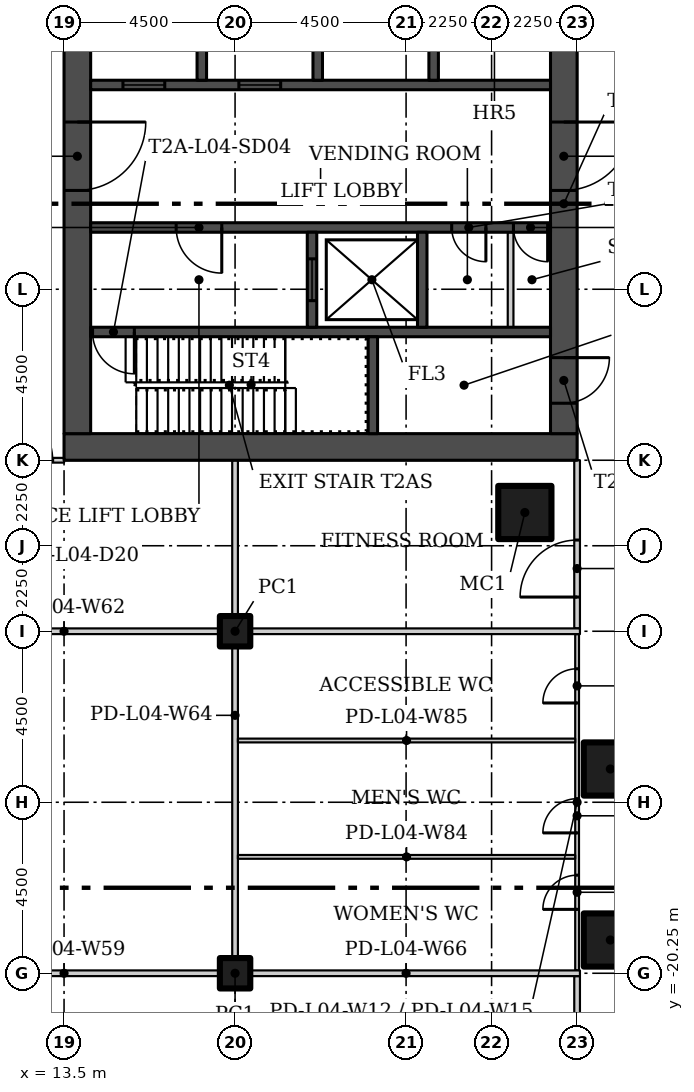
"""IFC4 building model, lengths in metres.
Left out: names, types, materials, properties, quantities, classifications, styles, units other than length and angle.
Written with IfcOpenShell. Run it as: python <this file> out.ifc"""

import sys

from ifc_helpers import new_model, si_unit, direction, frame, frame_2d, origin, origin_2d, place, context, subcontext, project, spatial, rectangle, hollow_rectangle, extrude, element, fill, save


model = new_model("IFC4")
c1 = context("Model", 3, precision=1e-05, world=origin(), true_north=direction((0.0, 1.0)))
c2 = subcontext(c1, "Body", "Model", "MODEL_VIEW")
j1 = project(units=[si_unit("LENGTHUNIT", "METRE"), si_unit("PLANEANGLEUNIT", "RADIAN")], contexts=[c1])
p1 = place(None, origin())
s1 = spatial("IfcSite", under=j1, at=p1, CompositionType="ELEMENT")
p2 = place(p1, origin())
s2 = spatial("IfcBuilding", under=s1, at=p2, CompositionType="ELEMENT")
p3 = place(p2, frame((0.0, 0.0, 23.5)))
s3 = spatial("IfcBuildingStorey", under=s2, at=p3, CompositionType="ELEMENT", Elevation=23.5)
for number, where in (
    (1, (25.625, -8.125, 0.0)),
    (2, (27.875, -14.875, 0.0)),
    (3, (27.875, -19.375, 0.0)),
):
    element("IfcColumn", number, at=place(p3, frame(where)), inside=s3, PredefinedType="COLUMN", context=c2, shape_type="SweptSolid", body=[
        extrude(hollow_rectangle(XDim=1.4, YDim=1.4, WallThickness=0.06, at=origin_2d()), origin(), (0.0, 0.0, 1.0), 4.65),
    ])
for number, where in (
    (4, (18.0, -20.25, 0.0)),
    (5, (18.0, -11.25, 0.0)),
):
    element("IfcColumn", number, at=place(p3, frame(where)), inside=s3, PredefinedType="COLUMN", context=c2, shape_type="SweptSolid", body=[
        extrude(hollow_rectangle(XDim=0.8, YDim=0.8, WallThickness=0.03, at=origin_2d()), origin(), (0.0, 0.0, 1.0), 4.65),
    ])
p4 = place(p3, frame((27.0, -20.325, 0.0), z_axis=(0.0, 0.0, 1.0), x_axis=(0.0, -1.0, 0.0)))
e6 = element("IfcWall", 6, at=p4, inside=s3, PredefinedType="PARTITIONING", context=c2, shape_type="SweptSolid", body=[
    extrude(rectangle(XDim=8.85, YDim=0.15, at=frame_2d((4.425, 0.0))), origin(), (0.0, 0.0, 1.0), 4.65),
])
p5 = place(p4, frame((4.275, 0.0, 0.0)))
e7 = element("IfcOpeningElement", 7, at=p5, cuts=e6, PredefinedType="OPENING", context=c2, shape_type="SweptSolid", body=[
    extrude(rectangle(XDim=1.5, YDim=2.1, at=frame_2d((0.75, 1.05))), frame((0.0, 0.085, 0.0), z_axis=(0.0, -1.0, 0.0), x_axis=(1.0, 0.0, 0.0)), (0.0, 0.0, 1.0), 0.17),
])
p6 = place(p3, frame((27.0, -20.175, 0.0), z_axis=(0.0, 0.0, 1.0), x_axis=(0.0, 1.0, 0.0)))
e8 = element("IfcWall", 8, at=p6, inside=s3, PredefinedType="PARTITIONING", context=c2, shape_type="SweptSolid", body=[
    extrude(rectangle(XDim=8.85, YDim=0.1, at=frame_2d((4.425, 0.0))), origin(), (0.0, 0.0, 1.0), 4.65),
])
p7 = place(p6, frame((1.606, 0.0, 0.0)))
e9 = element("IfcOpeningElement", 9, at=p7, cuts=e8, PredefinedType="OPENING", context=c2, shape_type="SweptSolid", body=[
    extrude(rectangle(XDim=0.9, YDim=2.1, at=frame_2d((0.45, 1.05))), frame((0.0, 0.06, 0.0), z_axis=(0.0, -1.0, 0.0), x_axis=(1.0, 0.0, 0.0)), (0.0, 0.0, 1.0), 0.12),
])
p8 = place(p6, frame((3.619, 0.0, 0.0)))
e10 = element("IfcOpeningElement", 10, at=p8, cuts=e8, PredefinedType="OPENING", context=c2, shape_type="SweptSolid", body=[
    extrude(rectangle(XDim=0.9, YDim=2.1, at=frame_2d((0.45, 1.05))), frame((0.0, 0.06, 0.0), z_axis=(0.0, -1.0, 0.0), x_axis=(1.0, 0.0, 0.0)), (0.0, 0.0, 1.0), 0.12),
])
p9 = place(p6, frame((7.038, 0.0, 0.0)))
e11 = element("IfcOpeningElement", 11, at=p9, cuts=e8, PredefinedType="OPENING", context=c2, shape_type="SweptSolid", body=[
    extrude(rectangle(XDim=0.9, YDim=2.1, at=frame_2d((0.45, 1.05))), frame((0.0, 0.06, 0.0), z_axis=(0.0, -1.0, 0.0), x_axis=(1.0, 0.0, 0.0)), (0.0, 0.0, 1.0), 0.12),
])
p10 = place(p3, frame((27.0, -11.175, 0.0), z_axis=(0.0, 0.0, 1.0), x_axis=(0.0, 1.0, 0.0)))
e12 = element("IfcWall", 12, at=p10, inside=s3, PredefinedType="PARTITIONING", context=c2, shape_type="SweptSolid", body=[
    extrude(rectangle(XDim=4.425, YDim=0.15, at=frame_2d((2.212, 0.0))), origin(), (0.0, 0.0, 1.0), 4.65),
])
p11 = place(p10, frame((0.825, 0.0, 0.0)))
e13 = element("IfcOpeningElement", 13, at=p11, cuts=e12, PredefinedType="OPENING", context=c2, shape_type="SweptSolid", body=[
    extrude(rectangle(XDim=1.5, YDim=2.1, at=frame_2d((0.75, 1.05))), frame((0.0, 0.085, 0.0), z_axis=(0.0, -1.0, 0.0), x_axis=(1.0, 0.0, 0.0)), (0.0, 0.0, 1.0), 0.17),
])
p12 = place(p3, frame((-13.5, -6.75, 0.0)))
e14 = element("IfcWall", 14, at=p12, inside=s3, PredefinedType="PARTITIONING", context=c2, shape_type="SweptSolid", body=[
    extrude(rectangle(XDim=27.0, YDim=0.125, at=frame_2d((13.5, 0.0))), origin(), (0.0, 0.0, 1.0), 4.65),
])
p13 = place(p12, frame((8.85, 0.0, 0.0)))
e15 = element("IfcOpeningElement", 15, at=p13, cuts=e14, PredefinedType="OPENING", context=c2, shape_type="SweptSolid", body=[
    extrude(rectangle(XDim=1.5, YDim=2.1, at=frame_2d((0.75, 1.05))), frame((0.0, 0.073, 0.0), z_axis=(0.0, -1.0, 0.0), x_axis=(1.0, 0.0, 0.0)), (0.0, 0.0, 1.0), 0.145),
])
p14 = place(p12, frame((14.55, 0.0, 0.0)))
e16 = element("IfcOpeningElement", 16, at=p14, cuts=e14, PredefinedType="OPENING", context=c2, shape_type="SweptSolid", body=[
    extrude(rectangle(XDim=1.5, YDim=2.1, at=frame_2d((0.75, 1.05))), frame((0.0, 0.073, 0.0), z_axis=(0.0, -1.0, 0.0), x_axis=(1.0, 0.0, 0.0)), (0.0, 0.0, 1.0), 0.145),
])
p15 = place(p12, frame((25.2, 0.0, 0.0)))
e17 = element("IfcOpeningElement", 17, at=p15, cuts=e14, PredefinedType="OPENING", context=c2, shape_type="SweptSolid", body=[
    extrude(rectangle(XDim=1.5, YDim=2.1, at=frame_2d((0.75, 1.05))), frame((0.0, 0.073, 0.0), z_axis=(0.0, -1.0, 0.0), x_axis=(1.0, 0.0, 0.0)), (0.0, 0.0, 1.0), 0.145),
])
p16 = place(p3, frame((8.925, -20.25, 0.0)))
e18 = element("IfcWall", 18, at=p16, inside=s3, PredefinedType="PARTITIONING", context=c2, shape_type="SweptSolid", body=[
    extrude(rectangle(XDim=9.15, YDim=0.15, at=frame_2d((4.575, 0.0))), origin(), (0.0, 0.0, 1.0), 4.65),
])
p17 = place(p3, frame((27.075, -11.25, 0.0), z_axis=(0.0, 0.0, 1.0), x_axis=(-1.0, 0.0, 0.0)))
e19 = element("IfcWall", 19, at=p17, inside=s3, PredefinedType="PARTITIONING", context=c2, shape_type="SweptSolid", body=[
    extrude(rectangle(XDim=27.15, YDim=0.15, at=frame_2d((13.575, 0.0))), origin(), (0.0, 0.0, 1.0), 4.65),
])
p18 = place(p3, frame((18.0, -20.175, 0.0), z_axis=(0.0, 0.0, 1.0), x_axis=(0.0, 1.0, 0.0)))
e20 = element("IfcWall", 20, at=p18, inside=s3, PredefinedType="PARTITIONING", context=c2, shape_type="SweptSolid", body=[
    extrude(rectangle(XDim=13.425, YDim=0.15, at=frame_2d((6.712, 0.0))), origin(), (0.0, 0.0, 1.0), 4.65),
])
p19 = place(p3, frame((27.075, -20.25, 0.0), z_axis=(0.0, 0.0, 1.0), x_axis=(-1.0, 0.0, 0.0)))
e21 = element("IfcWall", 21, at=p19, inside=s3, PredefinedType="PARTITIONING", context=c2, shape_type="SweptSolid", body=[
    extrude(rectangle(XDim=9.15, YDim=0.15, at=frame_2d((4.575, 0.0))), origin(), (0.0, 0.0, 1.0), 4.65),
])
for number, where, z_axis, x_axis in (
    (22, (26.95, -17.188, 0.0), (0.0, 0.0, 1.0), (-1.0, 0.0, 0.0)),
    (23, (26.95, -14.125, 0.0), (0.0, 0.0, 1.0), (-1.0, 0.0, 0.0)),
):
    element("IfcWall", number, at=place(p3, frame(where, z_axis=z_axis, x_axis=x_axis)), inside=s3, PredefinedType="PARTITIONING", context=c2, shape_type="SweptSolid", body=[
        extrude(rectangle(XDim=8.875, YDim=0.1, at=frame_2d((4.438, 0.0))), origin(), (0.0, 0.0, 1.0), 4.65),
    ])
p20 = place(p3, frame((13.5, -6.4, 0.0)))
e24 = element("IfcWall", 24, at=p20, inside=s3, PredefinedType="SHEAR", context=c2, shape_type="SweptSolid", body=[
    extrude(rectangle(XDim=13.5, YDim=0.7, at=frame_2d((6.75, 0.0))), origin(), (0.0, 0.0, 1.0), 4.65),
])
p21 = place(p3, frame((13.85, 6.05, 0.0), z_axis=(0.0, 0.0, 1.0), x_axis=(0.0, -1.0, 0.0)))
e25 = element("IfcWall", 25, at=p21, inside=s3, PredefinedType="SHEAR", context=c2, shape_type="SweptSolid", body=[
    extrude(rectangle(XDim=12.1, YDim=0.7, at=frame_2d((6.05, 0.0))), origin(), (0.0, 0.0, 1.0), 4.65),
])
p22 = place(p21, frame((3.9, 0.0, 0.0)))
e26 = element("IfcOpeningElement", 26, at=p22, cuts=e25, PredefinedType="OPENING", context=c2, shape_type="SweptSolid", body=[
    extrude(rectangle(XDim=1.8, YDim=2.4, at=frame_2d((0.9, 1.2))), frame((0.0, 0.36, 0.0), z_axis=(0.0, -1.0, 0.0), x_axis=(1.0, 0.0, 0.0)), (0.0, 0.0, 1.0), 0.72),
])
p23 = place(p3, frame((26.65, 6.05, 0.0), z_axis=(0.0, 0.0, 1.0), x_axis=(0.0, -1.0, 0.0)))
e27 = element("IfcWall", 27, at=p23, inside=s3, PredefinedType="SHEAR", context=c2, shape_type="SweptSolid", body=[
    extrude(rectangle(XDim=12.1, YDim=0.7, at=frame_2d((6.05, 0.0))), origin(), (0.0, 0.0, 1.0), 4.65),
])
p24 = place(p23, frame((10.1, 0.0, 0.0)))
e28 = element("IfcOpeningElement", 28, at=p24, cuts=e27, PredefinedType="OPENING", context=c2, shape_type="SweptSolid", body=[
    extrude(rectangle(XDim=1.2, YDim=2.1, at=frame_2d((0.6, 1.05))), frame((0.0, 0.36, 0.0), z_axis=(0.0, -1.0, 0.0), x_axis=(1.0, 0.0, 0.0)), (0.0, 0.0, 1.0), 0.72),
])
p25 = place(p23, frame((3.9, 0.0, 0.0)))
e29 = element("IfcOpeningElement", 29, at=p25, cuts=e27, PredefinedType="OPENING", context=c2, shape_type="SweptSolid", body=[
    extrude(rectangle(XDim=1.8, YDim=2.4, at=frame_2d((0.9, 1.2))), frame((0.0, 0.36, 0.0), z_axis=(0.0, -1.0, 0.0), x_axis=(1.0, 0.0, 0.0)), (0.0, 0.0, 1.0), 0.72),
])
p26 = place(p3, frame((26.3, -3.375, 0.0), z_axis=(0.0, 0.0, 1.0), x_axis=(-1.0, 0.0, 0.0)))
e30 = element("IfcWall", 30, at=p26, inside=s3, PredefinedType="SHEAR", context=c2, shape_type="SweptSolid", body=[
    extrude(rectangle(XDim=12.1, YDim=0.25, at=frame_2d((6.05, 0.0))), origin(), (0.0, 0.0, 1.0), 4.65),
])
p27 = place(p26, frame((10.95, 0.0, 0.0)))
e31 = element("IfcOpeningElement", 31, at=p27, cuts=e30, PredefinedType="OPENING", context=c2, shape_type="SweptSolid", body=[
    extrude(rectangle(XDim=1.1, YDim=2.1, at=frame_2d((0.55, 1.05))), frame((0.0, 0.135, 0.0), z_axis=(0.0, -1.0, 0.0), x_axis=(1.0, 0.0, 0.0)), (0.0, 0.0, 1.0), 0.27),
])
p28 = place(p3, frame((21.625, -6.05, 0.0), z_axis=(0.0, 0.0, 1.0), x_axis=(0.0, 1.0, 0.0)))
e32 = element("IfcWall", 32, at=p28, inside=s3, PredefinedType="SHEAR", context=c2, shape_type="SweptSolid", body=[
    extrude(rectangle(XDim=2.55, YDim=0.25, at=frame_2d((1.275, 0.0))), origin(), (0.0, 0.0, 1.0), 4.65),
])
p29 = place(p3, frame((26.3, -0.625, 0.0), z_axis=(0.0, 0.0, 1.0), x_axis=(-1.0, 0.0, 0.0)))
e33 = element("IfcWall", 33, at=p29, inside=s3, PredefinedType="SHEAR", context=c2, shape_type="SweptSolid", body=[
    extrude(rectangle(XDim=12.1, YDim=0.25, at=frame_2d((6.05, 0.0))), origin(), (0.0, 0.0, 1.0), 4.65),
])
p30 = place(p29, frame((8.65, 0.0, 0.0)))
e34 = element("IfcOpeningElement", 34, at=p30, cuts=e33, PredefinedType="OPENING", context=c2, shape_type="SweptSolid", body=[
    extrude(rectangle(XDim=1.2, YDim=2.1, at=frame_2d((0.6, 1.05))), frame((0.0, 0.135, 0.0), z_axis=(0.0, -1.0, 0.0), x_axis=(1.0, 0.0, 0.0)), (0.0, 0.0, 1.0), 0.27),
])
p31 = place(p29, frame((1.7, 0.0, 0.0)))
e35 = element("IfcOpeningElement", 35, at=p31, cuts=e33, PredefinedType="OPENING", context=c2, shape_type="SweptSolid", body=[
    extrude(rectangle(XDim=0.9, YDim=2.1, at=frame_2d((0.45, 1.05))), frame((0.0, 0.135, 0.0), z_axis=(0.0, -1.0, 0.0), x_axis=(1.0, 0.0, 0.0)), (0.0, 0.0, 1.0), 0.27),
])
p32 = place(p29, frame((0.075, 0.0, 0.0)))
e36 = element("IfcOpeningElement", 36, at=p32, cuts=e33, PredefinedType="OPENING", context=c2, shape_type="SweptSolid", body=[
    extrude(rectangle(XDim=0.9, YDim=2.1, at=frame_2d((0.45, 1.05))), frame((0.0, 0.135, 0.0), z_axis=(0.0, -1.0, 0.0), x_axis=(1.0, 0.0, 0.0)), (0.0, 0.0, 1.0), 0.27),
])
p33 = place(p3, frame((20.025, -3.25, 0.0), z_axis=(0.0, 0.0, 1.0), x_axis=(0.0, 1.0, 0.0)))
e37 = element("IfcWall", 37, at=p33, inside=s3, PredefinedType="SHEAR", context=c2, shape_type="SweptSolid", body=[
    extrude(rectangle(XDim=2.5, YDim=0.25, at=frame_2d((1.25, 0.0))), origin(), (0.0, 0.0, 1.0), 4.65),
])
p34 = place(p33, frame((0.7, 0.0, 0.0)))
e38 = element("IfcOpeningElement", 38, at=p34, cuts=e37, PredefinedType="OPENING", context=c2, shape_type="SweptSolid", body=[
    extrude(rectangle(XDim=1.1, YDim=2.1, at=frame_2d((0.55, 1.05))), frame((0.0, 0.135, 0.0), z_axis=(0.0, -1.0, 0.0), x_axis=(1.0, 0.0, 0.0)), (0.0, 0.0, 1.0), 0.27),
])
p35 = place(p3, frame((22.925, -3.25, 0.0), z_axis=(0.0, 0.0, 1.0), x_axis=(0.0, 1.0, 0.0)))
e39 = element("IfcWall", 39, at=p35, inside=s3, PredefinedType="SHEAR", context=c2, shape_type="SweptSolid", body=[
    extrude(rectangle(XDim=2.5, YDim=0.25, at=frame_2d((1.25, 0.0))), origin(), (0.0, 0.0, 1.0), 4.65),
])
p36 = place(p3, frame((25.25, -3.25, 0.0), z_axis=(0.0, 0.0, 1.0), x_axis=(0.0, 1.0, 0.0)))
e40 = element("IfcWall", 40, at=p36, inside=s3, PredefinedType="PARTITIONING", context=c2, shape_type="SweptSolid", body=[
    extrude(rectangle(XDim=2.5, YDim=0.15, at=frame_2d((1.25, 0.0))), origin(), (0.0, 0.0, 1.0), 4.65),
])
p37 = place(p3, frame((14.2, 3.125, 0.0)))
e41 = element("IfcWall", 41, at=p37, inside=s3, PredefinedType="SHEAR", context=c2, shape_type="SweptSolid", body=[
    extrude(rectangle(XDim=12.1, YDim=0.25, at=frame_2d((6.05, 0.0))), origin(), (0.0, 0.0, 1.0), 4.65),
])
p38 = place(p37, frame((0.85, 0.0, 0.0)))
e42 = element("IfcOpeningElement", 42, at=p38, cuts=e41, PredefinedType="OPENING", context=c2, shape_type="SweptSolid", body=[
    extrude(rectangle(XDim=1.1, YDim=2.1, at=frame_2d((0.55, 1.05))), frame((0.0, 0.135, 0.0), z_axis=(0.0, -1.0, 0.0), x_axis=(1.0, 0.0, 0.0)), (0.0, 0.0, 1.0), 0.27),
])
p39 = place(p37, frame((3.9, 0.0, 0.0)))
e43 = element("IfcOpeningElement", 43, at=p39, cuts=e41, PredefinedType="OPENING", context=c2, shape_type="SweptSolid", body=[
    extrude(rectangle(XDim=1.1, YDim=2.1, at=frame_2d((0.55, 1.05))), frame((0.0, 0.135, 0.0), z_axis=(0.0, -1.0, 0.0), x_axis=(1.0, 0.0, 0.0)), (0.0, 0.0, 1.0), 0.27),
])
for number, where, z_axis, x_axis in (
    (44, (17.125, 3.25, 0.0), (0.0, 0.0, 1.0), (0.0, 1.0, 0.0)),
    (45, (20.175, 3.25, 0.0), (0.0, 0.0, 1.0), (0.0, 1.0, 0.0)),
    (46, (23.225, 3.25, 0.0), (0.0, 0.0, 1.0), (0.0, 1.0, 0.0)),
):
    element("IfcWall", number, at=place(p3, frame(where, z_axis=z_axis, x_axis=x_axis)), inside=s3, PredefinedType="SHEAR", context=c2, shape_type="SweptSolid", body=[
        extrude(rectangle(XDim=2.8, YDim=0.25, at=frame_2d((1.4, 0.0))), origin(), (0.0, 0.0, 1.0), 4.65),
    ])
p40 = place(p7, origin())
e47 = element("IfcDoor", 47, at=p40, inside=s3, OperationType="SINGLE_SWING_RIGHT", PredefinedType="DOOR", context=c2, shape_type="SweptSolid", body=[
    extrude(rectangle(XDim=0.9, YDim=2.1, at=frame_2d((0.45, 1.05))), frame((0.0, 0.025, 0.0), z_axis=(0.0, -1.0, 0.0), x_axis=(1.0, 0.0, 0.0)), (0.0, 0.0, 1.0), 0.05),
])
fill(e9, e47)
p41 = place(p8, origin())
e48 = element("IfcDoor", 48, at=p41, inside=s3, OperationType="SINGLE_SWING_LEFT", PredefinedType="DOOR", context=c2, shape_type="SweptSolid", body=[
    extrude(rectangle(XDim=0.9, YDim=2.1, at=frame_2d((0.45, 1.05))), frame((0.0, 0.025, 0.0), z_axis=(0.0, -1.0, 0.0), x_axis=(1.0, 0.0, 0.0)), (0.0, 0.0, 1.0), 0.05),
])
fill(e10, e48)
p42 = place(p9, origin())
e49 = element("IfcDoor", 49, at=p42, inside=s3, OperationType="SINGLE_SWING_LEFT", PredefinedType="DOOR", context=c2, shape_type="SweptSolid", body=[
    extrude(rectangle(XDim=0.9, YDim=2.1, at=frame_2d((0.45, 1.05))), frame((0.0, 0.025, 0.0), z_axis=(0.0, -1.0, 0.0), x_axis=(1.0, 0.0, 0.0)), (0.0, 0.0, 1.0), 0.05),
])
fill(e11, e49)
p43 = place(p11, origin())
e50 = element("IfcDoor", 50, at=p43, inside=s3, OperationType="DOUBLE_DOOR_SINGLE_SWING", PredefinedType="DOOR", context=c2, shape_type="SweptSolid", body=[
    extrude(rectangle(XDim=1.5, YDim=2.1, at=frame_2d((0.75, 1.05))), frame((0.0, 0.025, 0.0), z_axis=(0.0, -1.0, 0.0), x_axis=(1.0, 0.0, 0.0)), (0.0, 0.0, 1.0), 0.05),
])
fill(e13, e50)
p44 = place(p22, origin())
e51 = element("IfcDoor", 51, at=p44, inside=s3, OperationType="DOUBLE_DOOR_SINGLE_SWING", PredefinedType="DOOR", context=c2, shape_type="SweptSolid", body=[
    extrude(rectangle(XDim=1.8, YDim=2.4, at=frame_2d((0.9, 1.2))), frame((0.0, 0.025, 0.0), z_axis=(0.0, -1.0, 0.0), x_axis=(1.0, 0.0, 0.0)), (0.0, 0.0, 1.0), 0.05),
])
fill(e26, e51)
p45 = place(p24, origin())
e52 = element("IfcDoor", 52, at=p45, inside=s3, OperationType="SINGLE_SWING_RIGHT", PredefinedType="DOOR", context=c2, shape_type="SweptSolid", body=[
    extrude(rectangle(XDim=1.2, YDim=2.1, at=frame_2d((0.6, 1.05))), frame((0.0, 0.025, 0.0), z_axis=(0.0, -1.0, 0.0), x_axis=(1.0, 0.0, 0.0)), (0.0, 0.0, 1.0), 0.05),
])
fill(e28, e52)
p46 = place(p25, origin())
e53 = element("IfcDoor", 53, at=p46, inside=s3, OperationType="DOUBLE_DOOR_SINGLE_SWING", PredefinedType="DOOR", context=c2, shape_type="SweptSolid", body=[
    extrude(rectangle(XDim=1.8, YDim=2.4, at=frame_2d((0.9, 1.2))), frame((0.0, 0.025, 0.0), z_axis=(0.0, -1.0, 0.0), x_axis=(1.0, 0.0, 0.0)), (0.0, 0.0, 1.0), 0.05),
])
fill(e29, e53)
p47 = place(p27, origin())
e54 = element("IfcDoor", 54, at=p47, inside=s3, OperationType="SINGLE_SWING_RIGHT", PredefinedType="DOOR", context=c2, shape_type="SweptSolid", body=[
    extrude(rectangle(XDim=1.1, YDim=2.1, at=frame_2d((0.55, 1.05))), frame((0.0, 0.025, 0.0), z_axis=(0.0, -1.0, 0.0), x_axis=(1.0, 0.0, 0.0)), (0.0, 0.0, 1.0), 0.05),
])
fill(e31, e54)
p48 = place(p30, origin())
e55 = element("IfcDoor", 55, at=p48, inside=s3, OperationType="SINGLE_SWING_RIGHT", PredefinedType="DOOR", context=c2, shape_type="SweptSolid", body=[
    extrude(rectangle(XDim=1.2, YDim=2.1, at=frame_2d((0.6, 1.05))), frame((0.0, 0.025, 0.0), z_axis=(0.0, -1.0, 0.0), x_axis=(1.0, 0.0, 0.0)), (0.0, 0.0, 1.0), 0.05),
])
fill(e34, e55)
p49 = place(p31, origin())
e56 = element("IfcDoor", 56, at=p49, inside=s3, OperationType="SINGLE_SWING_LEFT", PredefinedType="DOOR", context=c2, shape_type="SweptSolid", body=[
    extrude(rectangle(XDim=0.9, YDim=2.1, at=frame_2d((0.45, 1.05))), frame((0.0, 0.025, 0.0), z_axis=(0.0, -1.0, 0.0), x_axis=(1.0, 0.0, 0.0)), (0.0, 0.0, 1.0), 0.05),
])
fill(e35, e56)
p50 = place(p32, origin())
e57 = element("IfcDoor", 57, at=p50, inside=s3, OperationType="SINGLE_SWING_LEFT", PredefinedType="DOOR", context=c2, shape_type="SweptSolid", body=[
    extrude(rectangle(XDim=0.9, YDim=2.1, at=frame_2d((0.45, 1.05))), frame((0.0, 0.025, 0.0), z_axis=(0.0, -1.0, 0.0), x_axis=(1.0, 0.0, 0.0)), (0.0, 0.0, 1.0), 0.05),
])
fill(e36, e57)
p51 = place(p34, origin())
e58 = element("IfcDoor", 58, at=p51, inside=s3, OperationType="SLIDING_TO_LEFT", PredefinedType="DOOR", context=c2, shape_type="SweptSolid", body=[
    extrude(rectangle(XDim=1.1, YDim=2.1, at=frame_2d((0.55, 1.05))), frame((0.0, 0.025, 0.0), z_axis=(0.0, -1.0, 0.0), x_axis=(1.0, 0.0, 0.0)), (0.0, 0.0, 1.0), 0.05),
])
fill(e38, e58)
p52 = place(p38, origin())
e59 = element("IfcDoor", 59, at=p52, inside=s3, OperationType="SLIDING_TO_LEFT", PredefinedType="DOOR", context=c2, shape_type="SweptSolid", body=[
    extrude(rectangle(XDim=1.1, YDim=2.1, at=frame_2d((0.55, 1.05))), frame((0.0, 0.025, 0.0), z_axis=(0.0, -1.0, 0.0), x_axis=(1.0, 0.0, 0.0)), (0.0, 0.0, 1.0), 0.05),
])
fill(e42, e59)
p53 = place(p39, origin())
e60 = element("IfcDoor", 60, at=p53, inside=s3, OperationType="SLIDING_TO_LEFT", PredefinedType="DOOR", context=c2, shape_type="SweptSolid", body=[
    extrude(rectangle(XDim=1.1, YDim=2.1, at=frame_2d((0.55, 1.05))), frame((0.0, 0.025, 0.0), z_axis=(0.0, -1.0, 0.0), x_axis=(1.0, 0.0, 0.0)), (0.0, 0.0, 1.0), 0.05),
])
fill(e43, e60)
save(model, sys.argv[1])
